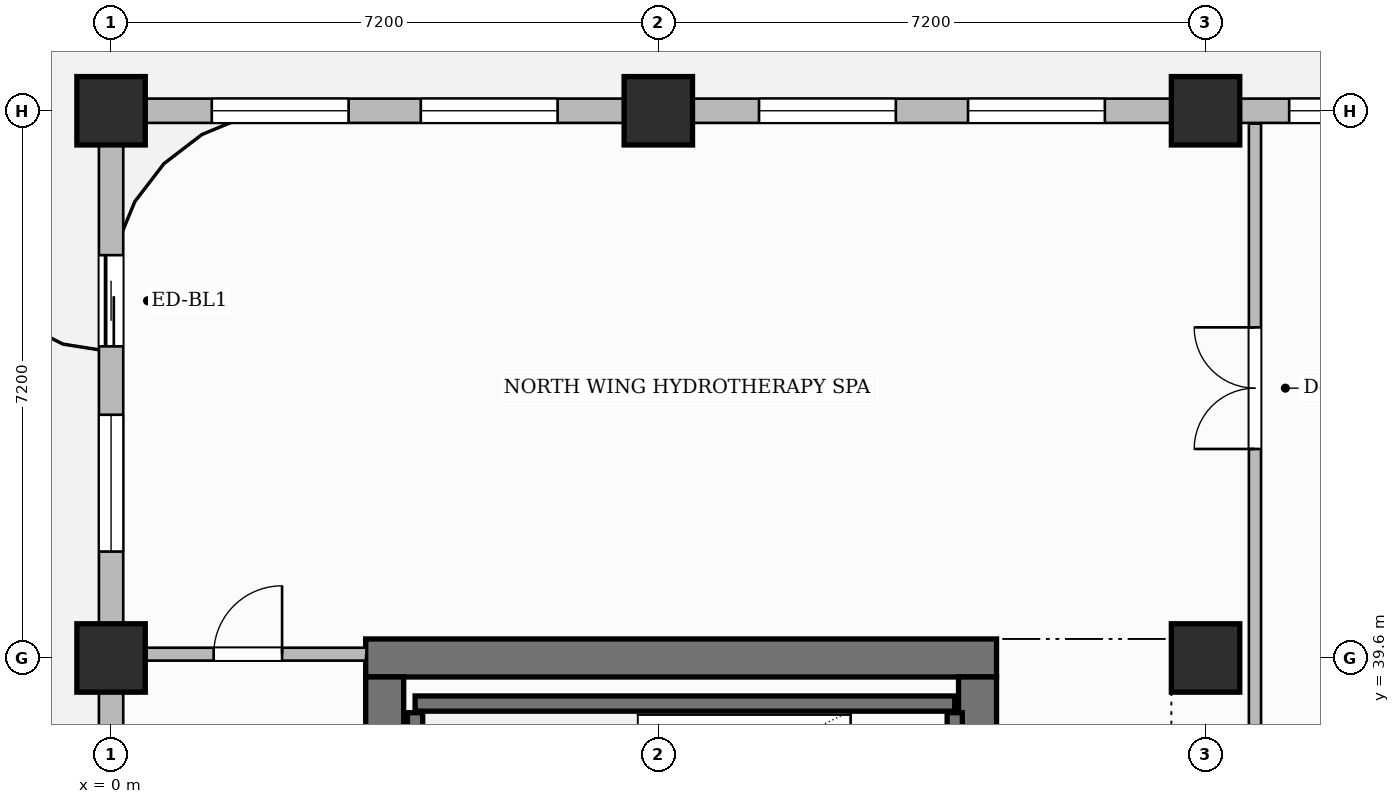
"""IFC4 building model, lengths in metres.
Left out: names, types, materials, properties, quantities, classifications, styles, units other than length and angle.
Written with IfcOpenShell. Run it as: python <this file> out.ifc"""

import sys

from ifc_helpers import new_model, si_unit, direction, frame, frame_2d, origin, origin_2d, place, context, subcontext, project, spatial, rectangle, extrude, source, transform, mapped, element, fill, save


model = new_model("IFC4")
c1 = context("Model", 3, precision=1e-05, world=origin(), true_north=direction((0.0, 1.0)))
c2 = subcontext(c1, "Body", "Model", "MODEL_VIEW")
j1 = project(units=[si_unit("LENGTHUNIT", "METRE"), si_unit("PLANEANGLEUNIT", "RADIAN")], contexts=[c1])
p1 = place(None, origin())
s1 = spatial("IfcSite", under=j1, at=p1, CompositionType="ELEMENT")
p2 = place(p1, origin())
s2 = spatial("IfcBuilding", under=s1, at=p2, CompositionType="ELEMENT")
p3 = place(p2, frame((0.0, 0.0, 201.9)))
s3 = spatial("IfcBuildingStorey", under=s2, at=p3, CompositionType="ELEMENT", Elevation=201.9)
p4 = place(p3, frame((3.35, 39.6, 0.0), z_axis=(0.0, 0.0, 1.0), x_axis=(1.0, 0.0, 0.0)))
e1 = element("IfcWall", 1, at=p4, inside=s3, PredefinedType="SHEAR", context=c2, shape_type="SweptSolid", body=[
    extrude(rectangle(XDim=8.3, YDim=0.5, at=frame_2d((4.15, 0.0))), origin(), (0.0, 0.0, 1.0), 3.85),
])
p5 = place(p3, frame((3.6, 25.45, 0.0), z_axis=(0.0, 0.0, 1.0), x_axis=(0.0, 1.0, 0.0)))
e2 = element("IfcWall", 2, at=p5, inside=s3, PredefinedType="SHEAR", context=c2, shape_type="SweptSolid", body=[
    extrude(rectangle(XDim=13.9, YDim=0.5, at=frame_2d((6.95, 0.0))), origin(), (0.0, 0.0, 1.0), 3.85),
])
p6 = place(p3, frame((11.4, 25.45, 0.0), z_axis=(0.0, 0.0, 1.0), x_axis=(0.0, 1.0, 0.0)))
e3 = element("IfcWall", 3, at=p6, inside=s3, PredefinedType="SHEAR", context=c2, shape_type="SweptSolid", body=[
    extrude(rectangle(XDim=13.9, YDim=0.5, at=frame_2d((6.95, 0.0))), origin(), (0.0, 0.0, 1.0), 3.85),
])
p7 = place(p6, frame((6.52, 0.0, 0.0)))
e4 = element("IfcOpeningElement", 4, at=p7, cuts=e3, PredefinedType="OPENING", context=c2, shape_type="SweptSolid", body=[
    extrude(rectangle(XDim=1.5, YDim=2.2, at=frame_2d((0.75, 1.1))), frame((0.0, 0.26, 0.0), z_axis=(0.0, -1.0, 0.0), x_axis=(1.0, 0.0, 0.0)), (0.0, 0.0, 1.0), 0.52),
])
m1 = source(origin(), c2, "Body", "SweptSolid", [
    extrude(rectangle(XDim=0.9, YDim=0.9, at=origin_2d()), origin(), (0.0, 0.0, 1.0), 3.85),
])
for number, where, z_axis, x_axis in (
    (5, (0.0, 39.6, 0.0), (0.0, 0.0, 1.0), (1.0, 0.0, 0.0)),
    (6, (0.0, 46.8, 0.0), (0.0, 0.0, 1.0), (1.0, 0.0, 0.0)),
    (7, (7.2, 46.8, 0.0), (0.0, 0.0, 1.0), (1.0, 0.0, 0.0)),
    (8, (14.4, 39.6, 0.0), (0.0, 0.0, 1.0), (1.0, 0.0, 0.0)),
    (9, (14.4, 46.8, 0.0), (0.0, 0.0, 1.0), (1.0, 0.0, 0.0)),
):
    element("IfcColumn", number, at=place(p3, frame(where, z_axis=z_axis, x_axis=x_axis)), inside=s3, PredefinedType="COLUMN", context=c2, shape_type="MappedRepresentation", body=[
        mapped(m1, transform((0.0, 0.0, 0.0), scale=1.0)),
    ])
p8 = place(p3, frame((4.0, 39.0, 0.0), z_axis=(0.0, 0.0, 1.0), x_axis=(1.0, 0.0, 0.0)))
e10 = element("IfcWall", 10, at=p8, inside=s3, PredefinedType="SHEAR", context=c2, shape_type="SweptSolid", body=[
    extrude(rectangle(XDim=7.1, YDim=0.2, at=frame_2d((3.55, 0.0))), origin(), (0.0, 0.0, 1.0), 3.85),
])
for number, where, z_axis, x_axis in (
    (11, (4.0, 36.18, 0.0), (0.0, 0.0, 1.0), (0.0, 1.0, 0.0)),
    (12, (11.1, 36.18, 0.0), (0.0, 0.0, 1.0), (0.0, 1.0, 0.0)),
):
    element("IfcWall", number, at=place(p3, frame(where, z_axis=z_axis, x_axis=x_axis)), inside=s3, PredefinedType="SHEAR", context=c2, shape_type="SweptSolid", body=[
        extrude(rectangle(XDim=2.7, YDim=0.2, at=frame_2d((1.35, 0.0))), origin(), (0.0, 0.0, 1.0), 3.85),
    ])
p9 = place(p3, frame((0.24, 39.65, 0.0), z_axis=(0.0, 0.0, 1.0), x_axis=(1.0, 0.0, 0.0)))
e13 = element("IfcWall", 13, at=p9, inside=s3, PredefinedType="PARTITIONING", context=c2, shape_type="SweptSolid", body=[
    extrude(rectangle(XDim=3.12, YDim=0.17, at=frame_2d((1.56, 0.0))), origin(), (0.0, 0.0, 1.0), 3.6),
])
p10 = place(p9, frame((1.11, 0.0, 0.0)))
e14 = element("IfcOpeningElement", 14, at=p10, cuts=e13, PredefinedType="OPENING", context=c2, shape_type="SweptSolid", body=[
    extrude(rectangle(XDim=0.9, YDim=2.15, at=frame_2d((0.45, 1.075))), frame((0.0, 0.095, 0.0), z_axis=(0.0, -1.0, 0.0), x_axis=(1.0, 0.0, 0.0)), (0.0, 0.0, 1.0), 0.19),
])
p11 = place(p3, frame((15.05, 34.34, 0.0), z_axis=(0.0, 0.0, 1.0), x_axis=(0.0, 1.0, 0.0)))
e15 = element("IfcWall", 15, at=p11, inside=s3, PredefinedType="PARTITIONING", context=c2, shape_type="SweptSolid", body=[
    extrude(rectangle(XDim=12.292, YDim=0.16, at=frame_2d((6.146, 0.0))), origin(), (0.0, 0.0, 1.0), 3.6),
])
p12 = place(p11, frame((8.01, 0.0, 0.0)))
e16 = element("IfcOpeningElement", 16, at=p12, cuts=e15, PredefinedType="OPENING", context=c2, shape_type="SweptSolid", body=[
    extrude(rectangle(XDim=1.6, YDim=2.4, at=frame_2d((0.8, 1.2))), frame((0.0, 0.09, 0.0), z_axis=(0.0, -1.0, 0.0), x_axis=(1.0, 0.0, 0.0)), (0.0, 0.0, 1.0), 0.18),
])
p13 = place(p3, frame((0.0, 25.25, 0.0), z_axis=(0.0, 0.0, 1.0), x_axis=(0.0, 1.0, 0.0)))
e17 = element("IfcWall", 17, at=p13, inside=s3, PredefinedType="SOLIDWALL", context=c2, shape_type="SweptSolid", body=[
    extrude(rectangle(XDim=21.5, YDim=0.32, at=frame_2d((10.75, 0.0))), origin(), (0.0, 0.0, 1.0), 3.085),
])
p14 = place(p13, frame((18.45, 0.0, 0.0)))
e18 = element("IfcOpeningElement", 18, at=p14, cuts=e17, PredefinedType="OPENING", context=c2, shape_type="SweptSolid", body=[
    extrude(rectangle(XDim=1.2, YDim=2.2, at=frame_2d((0.6, 1.1))), frame((0.0, 0.17, 0.0), z_axis=(0.0, -1.0, 0.0), x_axis=(1.0, 0.0, 0.0)), (0.0, 0.0, 1.0), 0.34),
])
p15 = place(p13, frame((0.8, 0.0, 0.0)))
e19 = element("IfcOpeningElement", 19, at=p15, cuts=e17, PredefinedType="OPENING", context=c2, shape_type="SweptSolid", body=[
    extrude(rectangle(XDim=1.2, YDim=2.2, at=frame_2d((0.6, 1.1))), frame((0.0, 0.17, 0.0), z_axis=(0.0, -1.0, 0.0), x_axis=(1.0, 0.0, 0.0)), (0.0, 0.0, 1.0), 0.34),
])
p16 = place(p13, frame((3.425, 0.0, 0.8)))
e20 = element("IfcOpeningElement", 20, at=p16, cuts=e17, PredefinedType="OPENING", context=c2, shape_type="SweptSolid", body=[
    extrude(rectangle(XDim=1.8, YDim=1.85, at=frame_2d((0.9, 0.925))), frame((0.0, 0.17, 0.0), z_axis=(0.0, -1.0, 0.0), x_axis=(1.0, 0.0, 0.0)), (0.0, 0.0, 1.0), 0.34),
])
p17 = place(p13, frame((8.475, 0.0, 0.8)))
e21 = element("IfcOpeningElement", 21, at=p17, cuts=e17, PredefinedType="OPENING", context=c2, shape_type="SweptSolid", body=[
    extrude(rectangle(XDim=1.8, YDim=1.85, at=frame_2d((0.9, 0.925))), frame((0.0, 0.17, 0.0), z_axis=(0.0, -1.0, 0.0), x_axis=(1.0, 0.0, 0.0)), (0.0, 0.0, 1.0), 0.34),
])
p18 = place(p13, frame((11.225, 0.0, 0.8)))
e22 = element("IfcOpeningElement", 22, at=p18, cuts=e17, PredefinedType="OPENING", context=c2, shape_type="SweptSolid", body=[
    extrude(rectangle(XDim=1.8, YDim=1.85, at=frame_2d((0.9, 0.925))), frame((0.0, 0.17, 0.0), z_axis=(0.0, -1.0, 0.0), x_axis=(1.0, 0.0, 0.0)), (0.0, 0.0, 1.0), 0.34),
])
p19 = place(p13, frame((15.75, 0.0, 0.8)))
e23 = element("IfcOpeningElement", 23, at=p19, cuts=e17, PredefinedType="OPENING", context=c2, shape_type="SweptSolid", body=[
    extrude(rectangle(XDim=1.8, YDim=1.85, at=frame_2d((0.9, 0.925))), frame((0.0, 0.17, 0.0), z_axis=(0.0, -1.0, 0.0), x_axis=(1.0, 0.0, 0.0)), (0.0, 0.0, 1.0), 0.34),
])
p20 = place(p3, frame((0.0, 46.8, 0.0), z_axis=(0.0, 0.0, 1.0), x_axis=(1.0, 0.0, 0.0)))
e24 = element("IfcWall", 24, at=p20, inside=s3, PredefinedType="SOLIDWALL", context=c2, shape_type="SweptSolid", body=[
    extrude(rectangle(XDim=18.0, YDim=0.32, at=frame_2d((9.0, 0.0))), origin(), (0.0, 0.0, 1.0), 3.085),
])
p21 = place(p20, frame((1.325, 0.0, 0.8)))
e25 = element("IfcOpeningElement", 25, at=p21, cuts=e24, PredefinedType="OPENING", context=c2, shape_type="SweptSolid", body=[
    extrude(rectangle(XDim=1.8, YDim=1.85, at=frame_2d((0.9, 0.925))), frame((0.0, 0.17, 0.0), z_axis=(0.0, -1.0, 0.0), x_axis=(1.0, 0.0, 0.0)), (0.0, 0.0, 1.0), 0.34),
])
p22 = place(p20, frame((4.075, 0.0, 0.8)))
e26 = element("IfcOpeningElement", 26, at=p22, cuts=e24, PredefinedType="OPENING", context=c2, shape_type="SweptSolid", body=[
    extrude(rectangle(XDim=1.8, YDim=1.85, at=frame_2d((0.9, 0.925))), frame((0.0, 0.17, 0.0), z_axis=(0.0, -1.0, 0.0), x_axis=(1.0, 0.0, 0.0)), (0.0, 0.0, 1.0), 0.34),
])
p23 = place(p20, frame((8.525, 0.0, 0.8)))
e27 = element("IfcOpeningElement", 27, at=p23, cuts=e24, PredefinedType="OPENING", context=c2, shape_type="SweptSolid", body=[
    extrude(rectangle(XDim=1.8, YDim=1.85, at=frame_2d((0.9, 0.925))), frame((0.0, 0.17, 0.0), z_axis=(0.0, -1.0, 0.0), x_axis=(1.0, 0.0, 0.0)), (0.0, 0.0, 1.0), 0.34),
])
p24 = place(p20, frame((11.275, 0.0, 0.8)))
e28 = element("IfcOpeningElement", 28, at=p24, cuts=e24, PredefinedType="OPENING", context=c2, shape_type="SweptSolid", body=[
    extrude(rectangle(XDim=1.8, YDim=1.85, at=frame_2d((0.9, 0.925))), frame((0.0, 0.17, 0.0), z_axis=(0.0, -1.0, 0.0), x_axis=(1.0, 0.0, 0.0)), (0.0, 0.0, 1.0), 0.34),
])
p25 = place(p20, frame((15.5, 0.0, 0.8)))
e29 = element("IfcOpeningElement", 29, at=p25, cuts=e24, PredefinedType="OPENING", context=c2, shape_type="SweptSolid", body=[
    extrude(rectangle(XDim=1.4, YDim=1.85, at=frame_2d((0.7, 0.925))), frame((0.0, 0.17, 0.0), z_axis=(0.0, -1.0, 0.0), x_axis=(1.0, 0.0, 0.0)), (0.0, 0.0, 1.0), 0.34),
])
m2 = source(origin(), c2, "Body", "SweptSolid", [
    extrude(rectangle(XDim=0.9, YDim=2.15, at=frame_2d((0.45, 1.075))), frame((0.0, 0.025, 0.0), z_axis=(0.0, -1.0, 0.0), x_axis=(1.0, 0.0, 0.0)), (0.0, 0.0, 1.0), 0.05),
])
p26 = place(p10, origin())
e30 = element("IfcDoor", 30, at=p26, inside=s3, OperationType="SINGLE_SWING_RIGHT", PredefinedType="DOOR", context=c2, shape_type="MappedRepresentation", body=[
    mapped(m2, transform((0.0, 0.0, 0.0), scale=1.0)),
])
fill(e14, e30)
m3 = source(origin(), c2, "Body", "SweptSolid", [
    extrude(rectangle(XDim=1.6, YDim=2.4, at=frame_2d((0.8, 1.2))), frame((0.0, 0.025, 0.0), z_axis=(0.0, -1.0, 0.0), x_axis=(1.0, 0.0, 0.0)), (0.0, 0.0, 1.0), 0.05),
])
p27 = place(p12, origin())
e31 = element("IfcDoor", 31, at=p27, inside=s3, OperationType="DOUBLE_DOOR_SINGLE_SWING", PredefinedType="DOOR", context=c2, shape_type="MappedRepresentation", body=[
    mapped(m3, transform((0.0, 0.0, 0.0), scale=1.0)),
])
fill(e16, e31)
m4 = source(origin(), c2, "Body", "SweptSolid", [
    extrude(rectangle(XDim=1.2, YDim=2.2, at=frame_2d((0.6, 1.1))), frame((0.0, 0.025, 0.0), z_axis=(0.0, -1.0, 0.0), x_axis=(1.0, 0.0, 0.0)), (0.0, 0.0, 1.0), 0.05),
])
p28 = place(p14, origin())
e32 = element("IfcDoor", 32, at=p28, inside=s3, OperationType="SLIDING_TO_LEFT", PredefinedType="DOOR", context=c2, shape_type="MappedRepresentation", body=[
    mapped(m4, transform((0.0, 0.0, 0.0), scale=1.0)),
])
fill(e18, e32)
m5 = source(origin(), c2, "Body", "SweptSolid", [
    extrude(rectangle(XDim=1.8, YDim=1.85, at=frame_2d((0.9, 0.925))), frame((0.0, 0.03, 0.0), z_axis=(0.0, -1.0, 0.0), x_axis=(1.0, 0.0, 0.0)), (0.0, 0.0, 1.0), 0.06),
])
p29 = place(p19, origin())
e33 = element("IfcWindow", 33, at=p29, inside=s3, PartitioningType="DOUBLE_PANEL_VERTICAL", PredefinedType="WINDOW", context=c2, shape_type="MappedRepresentation", body=[
    mapped(m5, transform((0.0, 0.0, 0.0), scale=1.0)),
])
fill(e23, e33)
p30 = place(p21, origin())
e34 = element("IfcWindow", 34, at=p30, inside=s3, PartitioningType="DOUBLE_PANEL_VERTICAL", PredefinedType="WINDOW", context=c2, shape_type="MappedRepresentation", body=[
    mapped(m5, transform((0.0, 0.0, 0.0), scale=1.0)),
])
fill(e25, e34)
p31 = place(p22, origin())
e35 = element("IfcWindow", 35, at=p31, inside=s3, PartitioningType="DOUBLE_PANEL_VERTICAL", PredefinedType="WINDOW", context=c2, shape_type="MappedRepresentation", body=[
    mapped(m5, transform((0.0, 0.0, 0.0), scale=1.0)),
])
fill(e26, e35)
p32 = place(p23, origin())
e36 = element("IfcWindow", 36, at=p32, inside=s3, PartitioningType="DOUBLE_PANEL_VERTICAL", PredefinedType="WINDOW", context=c2, shape_type="MappedRepresentation", body=[
    mapped(m5, transform((0.0, 0.0, 0.0), scale=1.0)),
])
fill(e27, e36)
p33 = place(p24, origin())
e37 = element("IfcWindow", 37, at=p33, inside=s3, PartitioningType="DOUBLE_PANEL_VERTICAL", PredefinedType="WINDOW", context=c2, shape_type="MappedRepresentation", body=[
    mapped(m5, transform((0.0, 0.0, 0.0), scale=1.0)),
])
fill(e28, e37)
m6 = source(origin(), c2, "Body", "SweptSolid", [
    extrude(rectangle(XDim=1.4, YDim=1.85, at=frame_2d((0.7, 0.925))), frame((0.0, 0.03, 0.0), z_axis=(0.0, -1.0, 0.0), x_axis=(1.0, 0.0, 0.0)), (0.0, 0.0, 1.0), 0.06),
])
p34 = place(p25, origin())
e38 = element("IfcWindow", 38, at=p34, inside=s3, PartitioningType="SINGLE_PANEL", PredefinedType="WINDOW", context=c2, shape_type="MappedRepresentation", body=[
    mapped(m6, transform((0.0, 0.0, 0.0), scale=1.0)),
])
fill(e29, e38)
save(model, sys.argv[1])
